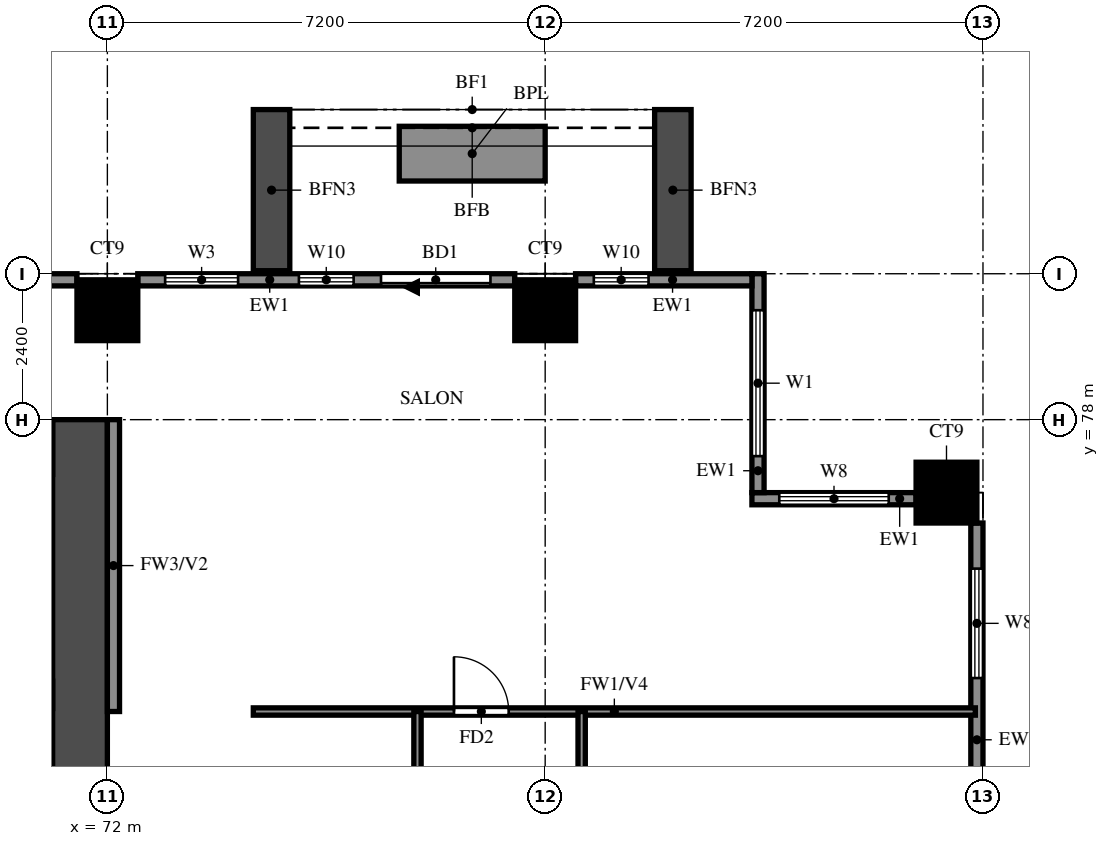
"""IFC4 building model, lengths in metres.
Left out: names, types, materials, properties, quantities, classifications, styles, units other than length and angle.
Written with IfcOpenShell. Run it as: python <this file> out.ifc"""

import sys

from ifc_helpers import new_model, si_unit, direction, frame, frame_2d, origin, origin_2d, place, context, subcontext, project, spatial, rectangle, extrude, source, transform, mapped, element, fill, save


model = new_model("IFC4")
c1 = context("Model", 3, precision=1e-05, world=origin(), true_north=direction((0.0, 1.0)))
c2 = subcontext(c1, "Body", "Model", "MODEL_VIEW")
j1 = project(units=[si_unit("LENGTHUNIT", "METRE"), si_unit("PLANEANGLEUNIT", "RADIAN")], contexts=[c1])
p1 = place(None, origin())
s1 = spatial("IfcSite", under=j1, at=p1, CompositionType="ELEMENT")
p2 = place(p1, origin())
s2 = spatial("IfcBuilding", under=s1, at=p2, CompositionType="ELEMENT")
p3 = place(p2, frame((0.0, 0.0, 62.0)))
s3 = spatial("IfcBuildingStorey", under=s2, at=p3, CompositionType="ELEMENT", Elevation=62.0)
m1 = source(origin(), c2, "Body", "SweptSolid", [
    extrude(rectangle(XDim=1.0, YDim=1.0, at=origin_2d()), origin(), (0.0, 0.0, 1.0), 3.18),
])
for number, where, z_axis, x_axis in (
    (1, (85.8, 76.8, 0.0), (0.0, 0.0, 1.0), (1.0, 0.0, 0.0)),
    (2, (72.0, 79.8, 0.0), (0.0, 0.0, 1.0), (1.0, 0.0, 0.0)),
    (3, (79.2, 79.8, 0.0), (0.0, 0.0, 1.0), (1.0, 0.0, 0.0)),
):
    element("IfcColumn", number, at=place(p3, frame(where, z_axis=z_axis, x_axis=x_axis)), inside=s3, PredefinedType="COLUMN", context=c2, shape_type="MappedRepresentation", body=[
        mapped(m1, transform((0.0, 0.0, 0.0))),
    ])
p4 = place(p3, frame((71.55, 66.0, 0.0), z_axis=(0.0, 0.0, 1.0), x_axis=(0.0, 1.0, 0.0)))
e4 = element("IfcWall", 4, at=p4, inside=s3, PredefinedType="SHEAR", context=c2, shape_type="SweptSolid", body=[
    extrude(rectangle(XDim=12.0, YDim=0.9, at=frame_2d((6.0, 0.0))), origin(), (0.0, 0.0, 1.0), 3.18),
])
p5 = place(p3, frame((29.7, 77.55, 0.0), z_axis=(0.0, 0.0, 1.0), x_axis=(1.0, 0.0, 0.0)))
e5 = element("IfcWall", 5, at=p5, inside=s3, PredefinedType="SHEAR", context=c2, shape_type="SweptSolid", body=[
    extrude(rectangle(XDim=41.4, YDim=0.9, at=frame_2d((20.7, 0.0))), origin(), (0.0, 0.0, 1.0), 3.18),
])
p6 = place(p3, frame((86.3, 70.1, 0.0), z_axis=(0.0, 0.0, 1.0), x_axis=(0.0, 1.0, 0.0)))
e6 = element("IfcWall", 6, at=p6, inside=s3, PredefinedType="SOLIDWALL", context=c2, shape_type="SweptSolid", body=[
    extrude(rectangle(XDim=6.2, YDim=0.2, at=frame_2d((3.1, 0.0))), origin(), (0.0, 0.0, 1.0), 3.18),
])
p7 = place(p6, frame((1.2, 0.0, 1.5)))
e7 = element("IfcOpeningElement", 7, at=p7, cuts=e6, PredefinedType="OPENING", context=c2, shape_type="SweptSolid", body=[
    extrude(rectangle(XDim=0.9, YDim=0.9, at=frame_2d((0.45, 0.45))), frame((0.0, 0.11, 0.0), z_axis=(0.0, -1.0, 0.0), x_axis=(1.0, 0.0, 0.0)), (0.0, 0.0, 1.0), 0.22),
])
p8 = place(p6, frame((3.65, 0.0, 0.6)))
e8 = element("IfcOpeningElement", 8, at=p8, cuts=e6, PredefinedType="OPENING", context=c2, shape_type="SweptSolid", body=[
    extrude(rectangle(XDim=1.8, YDim=2.4, at=frame_2d((0.9, 1.2))), frame((0.0, 0.11, 0.0), z_axis=(0.0, -1.0, 0.0), x_axis=(1.0, 0.0, 0.0)), (0.0, 0.0, 1.0), 0.22),
])
p9 = place(p3, frame((85.3, 76.7, 0.0), z_axis=(0.0, 0.0, 1.0), x_axis=(-1.0, 0.0, 0.0)))
e9 = element("IfcWall", 9, at=p9, inside=s3, PredefinedType="SOLIDWALL", context=c2, shape_type="SweptSolid", body=[
    extrude(rectangle(XDim=2.7, YDim=0.2, at=frame_2d((1.35, 0.0))), origin(), (0.0, 0.0, 1.0), 3.18),
])
p10 = place(p9, frame((0.45, 0.0, 0.6)))
e10 = element("IfcOpeningElement", 10, at=p10, cuts=e9, PredefinedType="OPENING", context=c2, shape_type="SweptSolid", body=[
    extrude(rectangle(XDim=1.8, YDim=2.4, at=frame_2d((0.9, 1.2))), frame((0.0, 0.11, 0.0), z_axis=(0.0, -1.0, 0.0), x_axis=(1.0, 0.0, 0.0)), (0.0, 0.0, 1.0), 0.22),
])
p11 = place(p3, frame((82.7, 76.8, 0.0), z_axis=(0.0, 0.0, 1.0), x_axis=(0.0, 1.0, 0.0)))
e11 = element("IfcWall", 11, at=p11, inside=s3, PredefinedType="SOLIDWALL", context=c2, shape_type="SweptSolid", body=[
    extrude(rectangle(XDim=3.6, YDim=0.2, at=frame_2d((1.8, 0.0))), origin(), (0.0, 0.0, 1.0), 3.18),
])
p12 = place(p11, frame((0.6, 0.0, 0.6)))
e12 = element("IfcOpeningElement", 12, at=p12, cuts=e11, PredefinedType="OPENING", context=c2, shape_type="SweptSolid", body=[
    extrude(rectangle(XDim=2.4, YDim=2.4, at=frame_2d((1.2, 1.2))), frame((0.0, 0.11, 0.0), z_axis=(0.0, -1.0, 0.0), x_axis=(1.0, 0.0, 0.0)), (0.0, 0.0, 1.0), 0.22),
])
p13 = place(p3, frame((82.6, 80.3, 0.0), z_axis=(0.0, 0.0, 1.0), x_axis=(-1.0, 0.0, 0.0)))
e13 = element("IfcWall", 13, at=p13, inside=s3, PredefinedType="SOLIDWALL", context=c2, shape_type="SweptSolid", body=[
    extrude(rectangle(XDim=2.9, YDim=0.2, at=frame_2d((1.45, 0.0))), origin(), (0.0, 0.0, 1.0), 3.18),
])
p14 = place(p13, frame((1.7, 0.0, 0.6)))
e14 = element("IfcOpeningElement", 14, at=p14, cuts=e13, PredefinedType="OPENING", context=c2, shape_type="SweptSolid", body=[
    extrude(rectangle(XDim=0.9, YDim=2.4, at=frame_2d((0.45, 1.2))), frame((0.0, 0.11, 0.0), z_axis=(0.0, -1.0, 0.0), x_axis=(1.0, 0.0, 0.0)), (0.0, 0.0, 1.0), 0.22),
])
p15 = place(p3, frame((78.7, 80.3, 0.0), z_axis=(0.0, 0.0, 1.0), x_axis=(-1.0, 0.0, 0.0)))
e15 = element("IfcWall", 15, at=p15, inside=s3, PredefinedType="SOLIDWALL", context=c2, shape_type="SweptSolid", body=[
    extrude(rectangle(XDim=6.2, YDim=0.2, at=frame_2d((3.1, 0.0))), origin(), (0.0, 0.0, 1.0), 3.18),
])
p16 = place(p15, frame((0.4, 0.0, 0.0)))
e16 = element("IfcOpeningElement", 16, at=p16, cuts=e15, PredefinedType="OPENING", context=c2, shape_type="SweptSolid", body=[
    extrude(rectangle(XDim=1.8, YDim=2.4, at=frame_2d((0.9, 1.2))), frame((0.0, 0.11, 0.0), z_axis=(0.0, -1.0, 0.0), x_axis=(1.0, 0.0, 0.0)), (0.0, 0.0, 1.0), 0.22),
])
p17 = place(p15, frame((2.65, 0.0, 0.6)))
e17 = element("IfcOpeningElement", 17, at=p17, cuts=e15, PredefinedType="OPENING", context=c2, shape_type="SweptSolid", body=[
    extrude(rectangle(XDim=0.9, YDim=2.4, at=frame_2d((0.45, 1.2))), frame((0.0, 0.11, 0.0), z_axis=(0.0, -1.0, 0.0), x_axis=(1.0, 0.0, 0.0)), (0.0, 0.0, 1.0), 0.22),
])
p18 = place(p15, frame((4.55, 0.0, 0.6)))
e18 = element("IfcOpeningElement", 18, at=p18, cuts=e15, PredefinedType="OPENING", context=c2, shape_type="SweptSolid", body=[
    extrude(rectangle(XDim=1.2, YDim=2.4, at=frame_2d((0.6, 1.2))), frame((0.0, 0.11, 0.0), z_axis=(0.0, -1.0, 0.0), x_axis=(1.0, 0.0, 0.0)), (0.0, 0.0, 1.0), 0.22),
])
p19 = place(p3, frame((71.5, 80.3, 0.0), z_axis=(0.0, 0.0, 1.0), x_axis=(-1.0, 0.0, 0.0)))
e19 = element("IfcWall", 19, at=p19, inside=s3, PredefinedType="SOLIDWALL", context=c2, shape_type="SweptSolid", body=[
    extrude(rectangle(XDim=6.2, YDim=0.2, at=frame_2d((3.1, 0.0))), origin(), (0.0, 0.0, 1.0), 3.18),
])
for number, where, z_axis, x_axis in (
    (20, (81.3, 80.45, 0.0), (0.0, 0.0, 1.0), (0.0, 1.0, 0.0)),
    (21, (74.7, 80.45, 0.0), (0.0, 0.0, 1.0), (0.0, 1.0, 0.0)),
):
    element("IfcWall", number, at=place(p3, frame(where, z_axis=z_axis, x_axis=x_axis)), inside=s3, PredefinedType="SOLIDWALL", context=c2, shape_type="SweptSolid", body=[
        extrude(rectangle(XDim=2.65, YDim=0.6, at=frame_2d((1.325, 0.0))), origin(), (0.0, 0.0, 1.0), 2.85),
    ])
p20 = place(p3, frame((79.2, 82.375, 0.0), z_axis=(0.0, 0.0, 1.0), x_axis=(-1.0, 0.0, 0.0)))
e22 = element("IfcWall", 22, at=p20, inside=s3, PredefinedType="SOLIDWALL", context=c2, shape_type="SweptSolid", body=[
    extrude(rectangle(XDim=2.4, YDim=0.9, at=frame_2d((1.2, 0.0))), origin(), (0.0, 0.0, 1.0), 0.9),
])
p21 = place(p3, frame((72.1, 73.2, 0.0), z_axis=(0.0, 0.0, 1.0), x_axis=(0.0, 1.0, 0.0)))
e23 = element("IfcWall", 23, at=p21, inside=s3, PredefinedType="SOLIDWALL", context=c2, shape_type="SweptSolid", body=[
    extrude(rectangle(XDim=4.8, YDim=0.2, at=frame_2d((2.4, 0.0))), origin(), (0.0, 0.0, 1.0), 3.18),
])
p22 = place(p3, frame((74.4, 73.2, 0.0), z_axis=(0.0, 0.0, 1.0), x_axis=(1.0, 0.0, 0.0)))
e24 = element("IfcWall", 24, at=p22, inside=s3, PredefinedType="PARTITIONING", context=c2, shape_type="SweptSolid", body=[
    extrude(rectangle(XDim=11.875, YDim=0.12, at=frame_2d((5.938, 0.0))), origin(), (0.0, 0.0, 1.0), 2.28),
])
p23 = place(p22, frame((3.3, 0.0, 0.0)))
e25 = element("IfcOpeningElement", 25, at=p23, cuts=e24, PredefinedType="OPENING", context=c2, shape_type="SweptSolid", body=[
    extrude(rectangle(XDim=0.9, YDim=2.1, at=frame_2d((0.45, 1.05))), frame((0.0, 0.07, 0.0), z_axis=(0.0, -1.0, 0.0), x_axis=(1.0, 0.0, 0.0)), (0.0, 0.0, 1.0), 0.14),
])
p24 = place(p3, frame((77.1, 64.8, 0.0), z_axis=(0.0, 0.0, 1.0), x_axis=(0.0, 1.0, 0.0)))
e26 = element("IfcWall", 26, at=p24, inside=s3, PredefinedType="PARTITIONING", context=c2, shape_type="SweptSolid", body=[
    extrude(rectangle(XDim=8.4, YDim=0.12, at=frame_2d((4.2, 0.0))), origin(), (0.0, 0.0, 1.0), 3.18),
])
p25 = place(p24, frame((5.05, 0.0, 0.0)))
e27 = element("IfcOpeningElement", 27, at=p25, cuts=e26, PredefinedType="OPENING", context=c2, shape_type="SweptSolid", body=[
    extrude(rectangle(XDim=0.9, YDim=2.1, at=frame_2d((0.45, 1.05))), frame((0.0, 0.07, 0.0), z_axis=(0.0, -1.0, 0.0), x_axis=(1.0, 0.0, 0.0)), (0.0, 0.0, 1.0), 0.14),
])
p26 = place(p3, frame((79.8, 69.6, 0.0), z_axis=(0.0, 0.0, 1.0), x_axis=(0.0, 1.0, 0.0)))
e28 = element("IfcWall", 28, at=p26, inside=s3, PredefinedType="PARTITIONING", context=c2, shape_type="SweptSolid", body=[
    extrude(rectangle(XDim=3.6, YDim=0.12, at=frame_2d((1.8, 0.0))), origin(), (0.0, 0.0, 1.0), 3.18),
])
p27 = place(p8, origin())
e29 = element("IfcWindow", 29, at=p27, inside=s3, PartitioningType="DOUBLE_PANEL_VERTICAL", PredefinedType="WINDOW", context=c2, shape_type="SweptSolid", body=[
    extrude(rectangle(XDim=1.8, YDim=2.4, at=frame_2d((0.9, 1.2))), frame((0.0, 0.03, 0.0), z_axis=(0.0, -1.0, 0.0), x_axis=(1.0, 0.0, 0.0)), (0.0, 0.0, 1.0), 0.06),
])
fill(e8, e29)
p28 = place(p10, origin())
e30 = element("IfcWindow", 30, at=p28, inside=s3, PartitioningType="DOUBLE_PANEL_VERTICAL", PredefinedType="WINDOW", context=c2, shape_type="SweptSolid", body=[
    extrude(rectangle(XDim=1.8, YDim=2.4, at=frame_2d((0.9, 1.2))), frame((0.0, 0.03, 0.0), z_axis=(0.0, -1.0, 0.0), x_axis=(1.0, 0.0, 0.0)), (0.0, 0.0, 1.0), 0.06),
])
fill(e10, e30)
p29 = place(p12, origin())
e31 = element("IfcWindow", 31, at=p29, inside=s3, PartitioningType="DOUBLE_PANEL_VERTICAL", PredefinedType="WINDOW", context=c2, shape_type="SweptSolid", body=[
    extrude(rectangle(XDim=2.4, YDim=2.4, at=frame_2d((1.2, 1.2))), frame((0.0, 0.03, 0.0), z_axis=(0.0, -1.0, 0.0), x_axis=(1.0, 0.0, 0.0)), (0.0, 0.0, 1.0), 0.06),
])
fill(e12, e31)
p30 = place(p14, origin())
e32 = element("IfcWindow", 32, at=p30, inside=s3, PartitioningType="SINGLE_PANEL", PredefinedType="WINDOW", context=c2, shape_type="SweptSolid", body=[
    extrude(rectangle(XDim=0.9, YDim=2.4, at=frame_2d((0.45, 1.2))), frame((0.0, 0.03, 0.0), z_axis=(0.0, -1.0, 0.0), x_axis=(1.0, 0.0, 0.0)), (0.0, 0.0, 1.0), 0.06),
])
fill(e14, e32)
p31 = place(p16, origin())
e33 = element("IfcDoor", 33, at=p31, inside=s3, OperationType="DOUBLE_DOOR_SLIDING", PredefinedType="DOOR", context=c2, shape_type="SweptSolid", body=[
    extrude(rectangle(XDim=1.8, YDim=2.4, at=frame_2d((0.9, 1.2))), frame((0.0, 0.025, 0.0), z_axis=(0.0, -1.0, 0.0), x_axis=(1.0, 0.0, 0.0)), (0.0, 0.0, 1.0), 0.05),
])
fill(e16, e33)
p32 = place(p17, origin())
e34 = element("IfcWindow", 34, at=p32, inside=s3, PartitioningType="SINGLE_PANEL", PredefinedType="WINDOW", context=c2, shape_type="SweptSolid", body=[
    extrude(rectangle(XDim=0.9, YDim=2.4, at=frame_2d((0.45, 1.2))), frame((0.0, 0.03, 0.0), z_axis=(0.0, -1.0, 0.0), x_axis=(1.0, 0.0, 0.0)), (0.0, 0.0, 1.0), 0.06),
])
fill(e17, e34)
p33 = place(p18, origin())
e35 = element("IfcWindow", 35, at=p33, inside=s3, PartitioningType="SINGLE_PANEL", PredefinedType="WINDOW", context=c2, shape_type="SweptSolid", body=[
    extrude(rectangle(XDim=1.2, YDim=2.4, at=frame_2d((0.6, 1.2))), frame((0.0, 0.03, 0.0), z_axis=(0.0, -1.0, 0.0), x_axis=(1.0, 0.0, 0.0)), (0.0, 0.0, 1.0), 0.06),
])
fill(e18, e35)
p34 = place(p23, origin())
e36 = element("IfcDoor", 36, at=p34, inside=s3, OperationType="SINGLE_SWING_LEFT", PredefinedType="DOOR", context=c2, shape_type="SweptSolid", body=[
    extrude(rectangle(XDim=0.9, YDim=2.1, at=frame_2d((0.45, 1.05))), frame((0.0, 0.025, 0.0), z_axis=(0.0, -1.0, 0.0), x_axis=(1.0, 0.0, 0.0)), (0.0, 0.0, 1.0), 0.05),
])
fill(e25, e36)
save(model, sys.argv[1])
